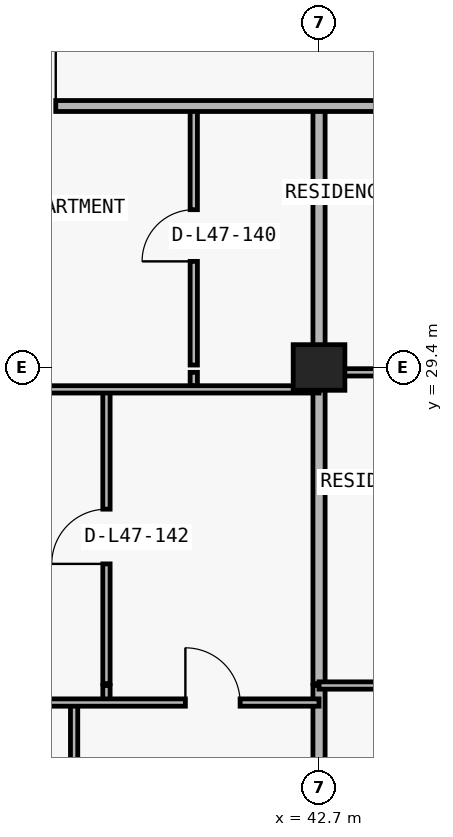
"""IFC4 building model, lengths in metres.
Left out: names, types, materials, properties, quantities, classifications, styles, units other than length and angle.
Written with IfcOpenShell. Run it as: python <this file> out.ifc"""

import sys

from ifc_helpers import new_model, si_unit, direction, frame, frame_2d, origin, origin_2d, place, context, subcontext, project, spatial, rectangle, extrude, element, fill, save


model = new_model("IFC4")
c1 = context("Model", 3, precision=1e-05, world=origin(), true_north=direction((0.0, 1.0)))
c2 = subcontext(c1, "Body", "Model", "MODEL_VIEW")
j1 = project(units=[si_unit("LENGTHUNIT", "METRE"), si_unit("PLANEANGLEUNIT", "RADIAN")], contexts=[c1])
p1 = place(None, origin())
s1 = spatial("IfcSite", under=j1, at=p1, CompositionType="ELEMENT")
p2 = place(p1, origin())
s2 = spatial("IfcBuilding", under=s1, at=p2, CompositionType="ELEMENT")
p3 = place(p2, frame((0.0, 0.0, 170.4)))
s3 = spatial("IfcBuildingStorey", under=s2, at=p3, CompositionType="ELEMENT", Elevation=170.4)
p4 = place(p3, frame((42.7, 29.4, 0.0), z_axis=(0.0, 0.0, 1.0), x_axis=(1.0, 0.0, 0.0)))
e1 = element("IfcColumn", 1, at=p4, inside=s3, PredefinedType="COLUMN", context=c2, shape_type="SweptSolid", body=[
    extrude(rectangle(XDim=0.85, YDim=0.75, at=origin_2d()), origin(), (0.0, 0.0, 1.0), 3.05),
])
p5 = place(p3, frame((38.672, 11.24, 0.0), z_axis=(0.0, 0.0, 1.0), x_axis=(0.0, 1.0, 0.0)))
e2 = element("IfcWall", 2, at=p5, inside=s3, PredefinedType="PARTITIONING", context=c2, shape_type="SweptSolid", body=[
    extrude(rectangle(XDim=12.65, YDim=0.12, at=frame_2d((6.325, 0.0))), origin(), (0.0, 0.0, 1.0), 3.05),
])
p6 = place(p3, frame((39.204, 23.89, 0.0), z_axis=(0.0, 0.0, 1.0), x_axis=(0.0, 1.0, 0.0)))
e3 = element("IfcWall", 3, at=p6, inside=s3, PredefinedType="PARTITIONING", context=c2, shape_type="SweptSolid", body=[
    extrude(rectangle(XDim=0.28, YDim=0.12, at=frame_2d((0.14, 0.0))), origin(), (0.0, 0.0, 1.0), 3.05),
])
p7 = place(p3, frame((39.204, 24.2, 0.0), z_axis=(0.0, 0.0, 1.0), x_axis=(0.0, 1.0, 0.0)))
e4 = element("IfcWall", 4, at=p7, inside=s3, PredefinedType="PARTITIONING", context=c2, shape_type="SweptSolid", body=[
    extrude(rectangle(XDim=4.84, YDim=0.12, at=frame_2d((2.42, 0.0))), origin(), (0.0, 0.0, 1.0), 3.05),
])
p8 = place(p7, frame((1.97, 0.0, 0.0)))
e5 = element("IfcOpeningElement", 5, at=p8, cuts=e4, PredefinedType="OPENING", context=c2, shape_type="SweptSolid", body=[
    extrude(rectangle(XDim=0.9, YDim=2.15, at=frame_2d((0.45, 1.075))), frame((0.0, 0.07, 0.0), z_axis=(0.0, -1.0, 0.0), x_axis=(1.0, 0.0, 0.0)), (0.0, 0.0, 1.0), 0.14),
])
p9 = place(p3, frame((40.64, 29.1, 0.0), z_axis=(0.0, 0.0, 1.0), x_axis=(0.0, 1.0, 0.0)))
e6 = element("IfcWall", 6, at=p9, inside=s3, PredefinedType="PARTITIONING", context=c2, shape_type="SweptSolid", body=[
    extrude(rectangle(XDim=0.22, YDim=0.12, at=frame_2d((0.11, 0.0))), origin(), (0.0, 0.0, 1.0), 3.05),
])
p10 = place(p3, frame((40.64, 29.44, 0.0), z_axis=(0.0, 0.0, 1.0), x_axis=(0.0, 1.0, 0.0)))
e7 = element("IfcWall", 7, at=p10, inside=s3, PredefinedType="PARTITIONING", context=c2, shape_type="SweptSolid", body=[
    extrude(rectangle(XDim=4.26, YDim=0.12, at=frame_2d((2.13, 0.0))), origin(), (0.0, 0.0, 1.0), 3.05),
])
p11 = place(p10, frame((1.705, 0.0, 0.0)))
e8 = element("IfcOpeningElement", 8, at=p11, cuts=e7, PredefinedType="OPENING", context=c2, shape_type="SweptSolid", body=[
    extrude(rectangle(XDim=0.85, YDim=2.1, at=frame_2d((0.425, 1.05))), frame((0.0, 0.07, 0.0), z_axis=(0.0, -1.0, 0.0), x_axis=(1.0, 0.0, 0.0)), (0.0, 0.0, 1.0), 0.14),
])
p12 = place(p3, frame((42.7, 11.24, 0.0), z_axis=(0.0, 0.0, 1.0), x_axis=(0.0, 1.0, 0.0)))
e9 = element("IfcWall", 9, at=p12, inside=s3, PredefinedType="PARTITIONING", context=c2, shape_type="SweptSolid", body=[
    extrude(rectangle(XDim=12.93, YDim=0.2, at=frame_2d((6.465, 0.0))), origin(), (0.0, 0.0, 1.0), 2.263),
])
p13 = place(p3, frame((42.7, 24.2, 0.0), z_axis=(0.0, 0.0, 1.0), x_axis=(0.0, 1.0, 0.0)))
e10 = element("IfcWall", 10, at=p13, inside=s3, PredefinedType="PARTITIONING", context=c2, shape_type="SweptSolid", body=[
    extrude(rectangle(XDim=4.84, YDim=0.2, at=frame_2d((2.42, 0.0))), origin(), (0.0, 0.0, 1.0), 2.263),
])
p14 = place(p3, frame((42.7, 29.1, 0.0), z_axis=(0.0, 0.0, 1.0), x_axis=(0.0, 1.0, 0.0)))
e11 = element("IfcWall", 11, at=p14, inside=s3, PredefinedType="PARTITIONING", context=c2, shape_type="SweptSolid", body=[
    extrude(rectangle(XDim=0.22, YDim=0.2, at=frame_2d((0.11, 0.0))), origin(), (0.0, 0.0, 1.0), 3.05),
])
p15 = place(p3, frame((42.7, 29.44, 0.0), z_axis=(0.0, 0.0, 1.0), x_axis=(0.0, 1.0, 0.0)))
e12 = element("IfcWall", 12, at=p15, inside=s3, PredefinedType="PARTITIONING", context=c2, shape_type="SweptSolid", body=[
    extrude(rectangle(XDim=4.26, YDim=0.2, at=frame_2d((2.13, 0.0))), origin(), (0.0, 0.0, 1.0), 2.263),
])
p16 = place(p3, frame((35.1, 23.89, 0.0), z_axis=(0.0, 0.0, 1.0), x_axis=(1.0, 0.0, 0.0)))
e13 = element("IfcWall", 13, at=p16, inside=s3, PredefinedType="PARTITIONING", context=c2, shape_type="SweptSolid", body=[
    extrude(rectangle(XDim=7.6, YDim=0.12, at=frame_2d((3.8, 0.0))), origin(), (0.0, 0.0, 1.0), 3.05),
])
p17 = place(p16, frame((1.336, 0.0, 0.0)))
e14 = element("IfcOpeningElement", 14, at=p17, cuts=e13, PredefinedType="OPENING", context=c2, shape_type="SweptSolid", body=[
    extrude(rectangle(XDim=0.9, YDim=2.15, at=frame_2d((0.45, 1.075))), frame((0.0, 0.07, 0.0), z_axis=(0.0, -1.0, 0.0), x_axis=(1.0, 0.0, 0.0)), (0.0, 0.0, 1.0), 0.14),
])
p18 = place(p16, frame((5.402, 0.0, 0.0)))
e15 = element("IfcOpeningElement", 15, at=p18, cuts=e13, PredefinedType="OPENING", context=c2, shape_type="SweptSolid", body=[
    extrude(rectangle(XDim=0.9, YDim=2.15, at=frame_2d((0.45, 1.075))), frame((0.0, 0.07, 0.0), z_axis=(0.0, -1.0, 0.0), x_axis=(1.0, 0.0, 0.0)), (0.0, 0.0, 1.0), 0.14),
])
p19 = place(p3, frame((42.7, 24.17, 0.0), z_axis=(0.0, 0.0, 1.0), x_axis=(1.0, 0.0, 0.0)))
e16 = element("IfcWall", 16, at=p19, inside=s3, PredefinedType="PARTITIONING", context=c2, shape_type="SweptSolid", body=[
    extrude(rectangle(XDim=8.18, YDim=0.12, at=frame_2d((4.09, 0.0))), origin(), (0.0, 0.0, 1.0), 3.05),
])
p20 = place(p19, frame((1.86, 0.0, 0.0)))
e17 = element("IfcOpeningElement", 17, at=p20, cuts=e16, PredefinedType="OPENING", context=c2, shape_type="SweptSolid", body=[
    extrude(rectangle(XDim=0.9, YDim=2.15, at=frame_2d((0.45, 1.075))), frame((0.0, 0.07, 0.0), z_axis=(0.0, -1.0, 0.0), x_axis=(1.0, 0.0, 0.0)), (0.0, 0.0, 1.0), 0.14),
])
p21 = place(p19, frame((6.033, 0.0, 0.0)))
e18 = element("IfcOpeningElement", 18, at=p21, cuts=e16, PredefinedType="OPENING", context=c2, shape_type="SweptSolid", body=[
    extrude(rectangle(XDim=0.9, YDim=2.15, at=frame_2d((0.45, 1.075))), frame((0.0, 0.07, 0.0), z_axis=(0.0, -1.0, 0.0), x_axis=(1.0, 0.0, 0.0)), (0.0, 0.0, 1.0), 0.14),
])
p22 = place(p3, frame((35.1, 29.04, 0.0), z_axis=(0.0, 0.0, 1.0), x_axis=(1.0, 0.0, 0.0)))
e19 = element("IfcWall", 19, at=p22, inside=s3, PredefinedType="PARTITIONING", context=c2, shape_type="SweptSolid", body=[
    extrude(rectangle(XDim=7.6, YDim=0.12, at=frame_2d((3.8, 0.0))), origin(), (0.0, 0.0, 1.0), 3.05),
])
p23 = place(p22, frame((1.602, 0.0, 0.0)))
e20 = element("IfcOpeningElement", 20, at=p23, cuts=e19, PredefinedType="OPENING", context=c2, shape_type="SweptSolid", body=[
    extrude(rectangle(XDim=0.9, YDim=2.15, at=frame_2d((0.45, 1.075))), frame((0.0, 0.07, 0.0), z_axis=(0.0, -1.0, 0.0), x_axis=(1.0, 0.0, 0.0)), (0.0, 0.0, 1.0), 0.14),
])
p24 = place(p3, frame((42.7, 29.32, 0.0), z_axis=(0.0, 0.0, 1.0), x_axis=(1.0, 0.0, 0.0)))
e21 = element("IfcWall", 21, at=p24, inside=s3, PredefinedType="PARTITIONING", context=c2, shape_type="SweptSolid", body=[
    extrude(rectangle(XDim=8.18, YDim=0.12, at=frame_2d((4.09, 0.0))), origin(), (0.0, 0.0, 1.0), 2.263),
])
p25 = place(p24, frame((1.943, 0.0, 0.0)))
e22 = element("IfcOpeningElement", 22, at=p25, cuts=e21, PredefinedType="OPENING", context=c2, shape_type="SweptSolid", body=[
    extrude(rectangle(XDim=0.9, YDim=2.15, at=frame_2d((0.45, 1.075))), frame((0.0, 0.07, 0.0), z_axis=(0.0, -1.0, 0.0), x_axis=(1.0, 0.0, 0.0)), (0.0, 0.0, 1.0), 0.14),
])
p26 = place(p3, frame((31.4, 33.7, 0.0), z_axis=(0.0, 0.0, 1.0), x_axis=(1.0, 0.0, 0.0)))
e23 = element("IfcWall", 23, at=p26, inside=s3, PredefinedType="PARTITIONING", context=c2, shape_type="SweptSolid", body=[
    extrude(rectangle(XDim=28.1, YDim=0.18, at=frame_2d((14.05, 0.0))), origin(), (0.0, 0.0, 1.0), 3.05),
])
p27 = place(p26, frame((5.97, 0.0, 0.0)))
e24 = element("IfcOpeningElement", 24, at=p27, cuts=e23, PredefinedType="OPENING", context=c2, shape_type="SweptSolid", body=[
    extrude(rectangle(XDim=1.0, YDim=2.2, at=frame_2d((0.5, 1.1))), frame((0.0, 0.1, 0.0), z_axis=(0.0, -1.0, 0.0), x_axis=(1.0, 0.0, 0.0)), (0.0, 0.0, 1.0), 0.2),
])
p28 = place(p26, frame((13.824, 0.0, 0.0)))
e25 = element("IfcOpeningElement", 25, at=p28, cuts=e23, PredefinedType="OPENING", context=c2, shape_type="SweptSolid", body=[
    extrude(rectangle(XDim=1.0, YDim=2.2, at=frame_2d((0.5, 1.1))), frame((0.0, 0.1, 0.0), z_axis=(0.0, -1.0, 0.0), x_axis=(1.0, 0.0, 0.0)), (0.0, 0.0, 1.0), 0.2),
])
p29 = place(p26, frame((22.349, 0.0, 0.0)))
e26 = element("IfcOpeningElement", 26, at=p29, cuts=e23, PredefinedType="OPENING", context=c2, shape_type="SweptSolid", body=[
    extrude(rectangle(XDim=1.0, YDim=2.2, at=frame_2d((0.5, 1.1))), frame((0.0, 0.1, 0.0), z_axis=(0.0, -1.0, 0.0), x_axis=(1.0, 0.0, 0.0)), (0.0, 0.0, 1.0), 0.2),
])
p30 = place(p27, origin())
e27 = element("IfcDoor", 27, at=p30, inside=s3, OperationType="SINGLE_SWING_RIGHT", PredefinedType="DOOR", context=c2, shape_type="SweptSolid", body=[
    extrude(rectangle(XDim=1.0, YDim=2.2, at=frame_2d((0.5, 1.1))), frame((0.0, 0.025, 0.0), z_axis=(0.0, -1.0, 0.0), x_axis=(1.0, 0.0, 0.0)), (0.0, 0.0, 1.0), 0.05),
])
fill(e24, e27)
p31 = place(p11, origin())
e28 = element("IfcDoor", 28, at=p31, inside=s3, OperationType="SINGLE_SWING_LEFT", PredefinedType="DOOR", context=c2, shape_type="SweptSolid", body=[
    extrude(rectangle(XDim=0.85, YDim=2.1, at=frame_2d((0.425, 1.05))), frame((0.0, 0.025, 0.0), z_axis=(0.0, -1.0, 0.0), x_axis=(1.0, 0.0, 0.0)), (0.0, 0.0, 1.0), 0.05),
])
fill(e8, e28)
p32 = place(p8, origin())
e29 = element("IfcDoor", 29, at=p32, inside=s3, OperationType="SINGLE_SWING_LEFT", PredefinedType="DOOR", context=c2, shape_type="SweptSolid", body=[
    extrude(rectangle(XDim=0.9, YDim=2.15, at=frame_2d((0.45, 1.075))), frame((0.0, 0.025, 0.0), z_axis=(0.0, -1.0, 0.0), x_axis=(1.0, 0.0, 0.0)), (0.0, 0.0, 1.0), 0.05),
])
fill(e5, e29)
p33 = place(p18, origin())
e30 = element("IfcDoor", 30, at=p33, inside=s3, OperationType="SINGLE_SWING_LEFT", PredefinedType="DOOR", context=c2, shape_type="SweptSolid", body=[
    extrude(rectangle(XDim=0.9, YDim=2.15, at=frame_2d((0.45, 1.075))), frame((0.0, 0.025, 0.0), z_axis=(0.0, -1.0, 0.0), x_axis=(1.0, 0.0, 0.0)), (0.0, 0.0, 1.0), 0.05),
])
fill(e15, e30)
save(model, sys.argv[1])
